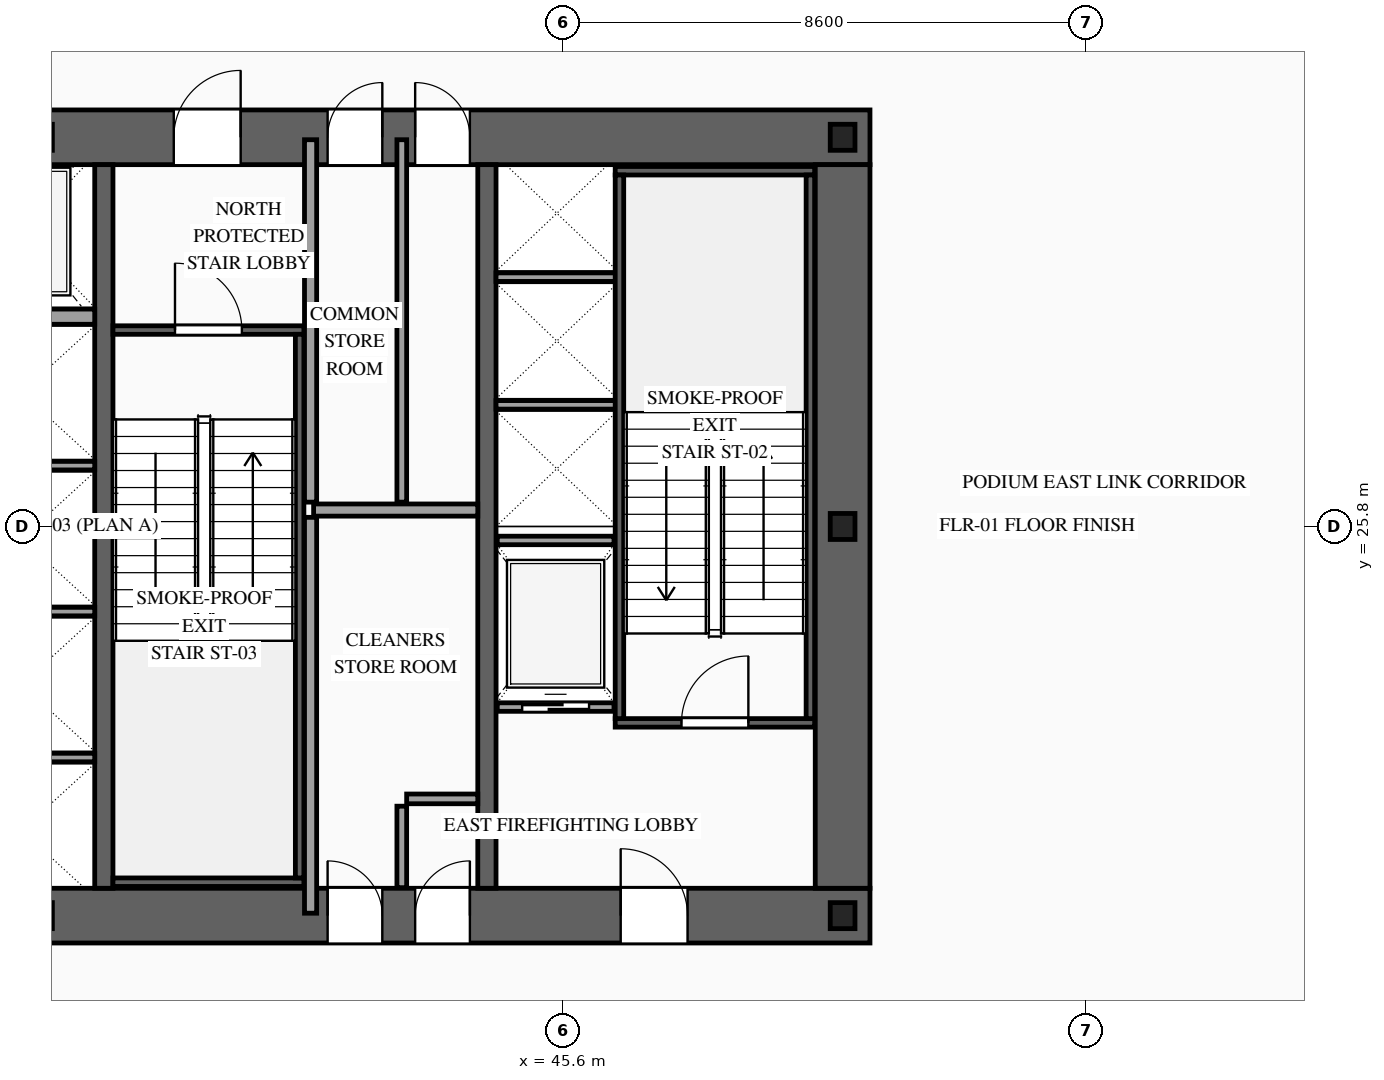
"""IFC4 building model, lengths in metres.
Left out: names, types, materials, properties, quantities, classifications, styles, units other than length and angle.
Written with IfcOpenShell. Run it as: python <this file> out.ifc"""

import sys

from ifc_helpers import new_model, si_unit, direction, frame, frame_2d, origin, origin_2d, place, context, subcontext, project, spatial, rectangle, i_section, extrude, source, transform, mapped, element, fill, save


model = new_model("IFC4")
c1 = context("Model", 3, precision=1e-05, world=origin(), true_north=direction((0.0, 1.0)))
c2 = subcontext(c1, "Body", "Model", "MODEL_VIEW")
j1 = project(units=[si_unit("LENGTHUNIT", "METRE"), si_unit("PLANEANGLEUNIT", "RADIAN")], contexts=[c1])
p1 = place(None, origin())
s1 = spatial("IfcSite", under=j1, at=p1, CompositionType="ELEMENT")
p2 = place(p1, origin())
s2 = spatial("IfcBuilding", under=s1, at=p2, CompositionType="ELEMENT")
p3 = place(p2, frame((0.0, 0.0, 5.4)))
s3 = spatial("IfcBuildingStorey", under=s2, at=p3, CompositionType="ELEMENT", Elevation=5.4)
p4 = place(p3, frame((23.35, 19.4, 0.0), z_axis=(0.0, 0.0, 1.0), x_axis=(1.0, 0.0, 0.0)))
e1 = element("IfcWall", 1, at=p4, inside=s3, PredefinedType="SHEAR", context=c2, shape_type="SweptSolid", body=[
    extrude(rectangle(XDim=27.3, YDim=0.9, at=frame_2d((13.65, 0.0))), origin(), (0.0, 0.0, 1.0), 4.8),
])
p5 = place(p4, frame((2.1, 0.0, 0.0)))
e2 = element("IfcOpeningElement", 2, at=p5, cuts=e1, PredefinedType="OPENING", context=c2, shape_type="SweptSolid", body=[
    extrude(rectangle(XDim=1.1, YDim=2.2, at=frame_2d((0.55, 1.1))), frame((0.0, 0.465, 0.0), z_axis=(0.0, -1.0, 0.0), x_axis=(1.0, 0.0, 0.0)), (0.0, 0.0, 1.0), 0.93),
])
p6 = place(p4, frame((10.0, 0.0, 0.0)))
e3 = element("IfcOpeningElement", 3, at=p6, cuts=e1, PredefinedType="OPENING", context=c2, shape_type="SweptSolid", body=[
    extrude(rectangle(XDim=1.1, YDim=2.2, at=frame_2d((0.55, 1.1))), frame((0.0, 0.465, 0.0), z_axis=(0.0, -1.0, 0.0), x_axis=(1.0, 0.0, 0.0)), (0.0, 0.0, 1.0), 0.93),
])
p7 = place(p4, frame((23.2, 0.0, 0.0)))
e4 = element("IfcOpeningElement", 4, at=p7, cuts=e1, PredefinedType="OPENING", context=c2, shape_type="SweptSolid", body=[
    extrude(rectangle(XDim=1.1, YDim=2.2, at=frame_2d((0.55, 1.1))), frame((0.0, 0.465, 0.0), z_axis=(0.0, -1.0, 0.0), x_axis=(1.0, 0.0, 0.0)), (0.0, 0.0, 1.0), 0.93),
])
p8 = place(p4, frame((19.82, 0.0, 0.0)))
e5 = element("IfcOpeningElement", 5, at=p8, cuts=e1, PredefinedType="OPENING", context=c2, shape_type="SweptSolid", body=[
    extrude(rectangle(XDim=0.9, YDim=2.15, at=frame_2d((0.45, 1.075))), frame((0.0, 0.465, 0.0), z_axis=(0.0, -1.0, 0.0), x_axis=(1.0, 0.0, 0.0)), (0.0, 0.0, 1.0), 0.93),
])
p9 = place(p4, frame((18.38, 0.0, 0.0)))
e6 = element("IfcOpeningElement", 6, at=p9, cuts=e1, PredefinedType="OPENING", context=c2, shape_type="SweptSolid", body=[
    extrude(rectangle(XDim=0.9, YDim=2.15, at=frame_2d((0.45, 1.075))), frame((0.0, 0.465, 0.0), z_axis=(0.0, -1.0, 0.0), x_axis=(1.0, 0.0, 0.0)), (0.0, 0.0, 1.0), 0.93),
])
p10 = place(p3, frame((23.35, 32.2, 0.0), z_axis=(0.0, 0.0, 1.0), x_axis=(1.0, 0.0, 0.0)))
e7 = element("IfcWall", 7, at=p10, inside=s3, PredefinedType="SHEAR", context=c2, shape_type="SweptSolid", body=[
    extrude(rectangle(XDim=27.3, YDim=0.9, at=frame_2d((13.65, 0.0))), origin(), (0.0, 0.0, 1.0), 4.8),
])
p11 = place(p10, frame((4.72, 0.0, 0.0)))
e8 = element("IfcOpeningElement", 8, at=p11, cuts=e7, PredefinedType="OPENING", context=c2, shape_type="SweptSolid", body=[
    extrude(rectangle(XDim=0.9, YDim=2.15, at=frame_2d((0.45, 1.075))), frame((0.0, 0.465, 0.0), z_axis=(0.0, -1.0, 0.0), x_axis=(1.0, 0.0, 0.0)), (0.0, 0.0, 1.0), 0.93),
])
p12 = place(p10, frame((10.0, 0.0, 0.0)))
e9 = element("IfcOpeningElement", 9, at=p12, cuts=e7, PredefinedType="OPENING", context=c2, shape_type="SweptSolid", body=[
    extrude(rectangle(XDim=1.1, YDim=2.2, at=frame_2d((0.55, 1.1))), frame((0.0, 0.465, 0.0), z_axis=(0.0, -1.0, 0.0), x_axis=(1.0, 0.0, 0.0)), (0.0, 0.0, 1.0), 0.93),
])
p13 = place(p10, frame((15.85, 0.0, 0.0)))
e10 = element("IfcOpeningElement", 10, at=p13, cuts=e7, PredefinedType="OPENING", context=c2, shape_type="SweptSolid", body=[
    extrude(rectangle(XDim=1.1, YDim=2.2, at=frame_2d((0.55, 1.1))), frame((0.0, 0.465, 0.0), z_axis=(0.0, -1.0, 0.0), x_axis=(1.0, 0.0, 0.0)), (0.0, 0.0, 1.0), 0.93),
])
p14 = place(p10, frame((18.38, 0.0, 0.0)))
e11 = element("IfcOpeningElement", 11, at=p14, cuts=e7, PredefinedType="OPENING", context=c2, shape_type="SweptSolid", body=[
    extrude(rectangle(XDim=0.9, YDim=2.15, at=frame_2d((0.45, 1.075))), frame((0.0, 0.465, 0.0), z_axis=(0.0, -1.0, 0.0), x_axis=(1.0, 0.0, 0.0)), (0.0, 0.0, 1.0), 0.93),
])
p15 = place(p10, frame((19.82, 0.0, 0.0)))
e12 = element("IfcOpeningElement", 12, at=p15, cuts=e7, PredefinedType="OPENING", context=c2, shape_type="SweptSolid", body=[
    extrude(rectangle(XDim=0.9, YDim=2.15, at=frame_2d((0.45, 1.075))), frame((0.0, 0.465, 0.0), z_axis=(0.0, -1.0, 0.0), x_axis=(1.0, 0.0, 0.0)), (0.0, 0.0, 1.0), 0.93),
])
m1 = source(origin(), c2, "Body", "SweptSolid", [
    extrude(rectangle(XDim=11.9, YDim=0.9, at=frame_2d((5.95, 0.0))), origin(), (0.0, 0.0, 1.0), 4.8),
])
p16 = place(p3, frame((50.2, 19.85, 0.0), z_axis=(0.0, 0.0, 1.0), x_axis=(0.0, 1.0, 0.0)))
e13 = element("IfcWall", 13, at=p16, inside=s3, PredefinedType="SHEAR", context=c2, shape_type="MappedRepresentation", body=[
    mapped(m1, transform((0.0, 0.0, 0.0), scale=1.0)),
])
m2 = source(origin(), c2, "Body", "SweptSolid", [
    extrude(rectangle(XDim=11.9, YDim=0.3, at=frame_2d((5.95, 0.0))), origin(), (0.0, 0.0, 1.0), 4.8),
])
for number, where, z_axis, x_axis in (
    (14, (38.05, 19.85, 0.0), (0.0, 0.0, 1.0), (0.0, 1.0, 0.0)),
    (15, (44.35, 19.85, 0.0), (0.0, 0.0, 1.0), (0.0, 1.0, 0.0)),
):
    element("IfcWall", number, at=place(p3, frame(where, z_axis=z_axis, x_axis=x_axis)), inside=s3, PredefinedType="SOLIDWALL", context=c2, shape_type="MappedRepresentation", body=[
        mapped(m2, transform((0.0, 0.0, 0.0), scale=1.0)),
    ])
m3 = source(origin(), c2, "Body", "SweptSolid", [
    extrude(i_section(OverallWidth=0.407, OverallDepth=0.428, WebThickness=0.02, FlangeThickness=0.035, at=origin_2d()), origin(), (0.0, 0.0, 1.0), 4.8),
])
for number, where, z_axis, x_axis in (
    (16, (37.0, 19.4, 0.0), (0.0, 0.0, 1.0), (1.0, 0.0, 0.0)),
    (17, (50.2, 19.4, 0.0), (0.0, 0.0, 1.0), (1.0, 0.0, 0.0)),
    (18, (50.2, 25.8, 0.0), (0.0, 0.0, 1.0), (1.0, 0.0, 0.0)),
    (19, (37.0, 32.2, 0.0), (0.0, 0.0, 1.0), (1.0, 0.0, 0.0)),
    (20, (50.2, 32.2, 0.0), (0.0, 0.0, 1.0), (1.0, 0.0, 0.0)),
):
    element("IfcColumn", number, at=place(p3, frame(where, z_axis=z_axis, x_axis=x_axis)), inside=s3, PredefinedType="COLUMN", context=c2, shape_type="MappedRepresentation", body=[
        mapped(m3, transform((0.0, 0.0, 0.0), scale=1.0)),
    ])
p17 = place(p3, frame((44.52, 22.83, 0.0), z_axis=(0.0, 0.0, 1.0), x_axis=(1.0, 0.0, 0.0)))
e21 = element("IfcWall", 21, at=p17, inside=s3, PredefinedType="SOLIDWALL", context=c2, shape_type="SweptSolid", body=[
    extrude(rectangle(XDim=1.92, YDim=0.14, at=frame_2d((0.96, 0.0))), origin(), (0.0, 0.0, 1.0), 4.52),
])
p18 = place(p17, frame((0.41, 0.0, 0.0)))
e22 = element("IfcOpeningElement", 22, at=p18, cuts=e21, PredefinedType="OPENING", context=c2, shape_type="SweptSolid", body=[
    extrude(rectangle(XDim=1.1, YDim=2.2, at=frame_2d((0.55, 1.1))), frame((0.0, 0.085, 0.0), z_axis=(0.0, -1.0, 0.0), x_axis=(1.0, 0.0, 0.0)), (0.0, 0.0, 1.0), 0.17),
])
m4 = source(origin(), c2, "Body", "SweptSolid", [
    extrude(rectangle(XDim=1.92, YDim=0.14, at=frame_2d((0.96, 0.0))), origin(), (0.0, 0.0, 1.0), 4.52),
])
p19 = place(p3, frame((44.52, 25.57, 0.0), z_axis=(0.0, 0.0, 1.0), x_axis=(1.0, 0.0, 0.0)))
e23 = element("IfcWall", 23, at=p19, inside=s3, PredefinedType="SOLIDWALL", context=c2, shape_type="MappedRepresentation", body=[
    mapped(m4, transform((0.0, 0.0, 0.0), scale=1.0)),
])
m5 = source(origin(), c2, "Body", "SweptSolid", [
    extrude(rectangle(XDim=2.4, YDim=0.14, at=frame_2d((1.2, 0.0))), origin(), (0.0, 0.0, 1.0), 4.52),
])
for number, where, z_axis, x_axis in (
    (24, (35.5, 22.0, 0.0), (0.0, 0.0, 1.0), (1.0, 0.0, 0.0)),
    (25, (35.5, 24.4, 0.0), (0.0, 0.0, 1.0), (1.0, 0.0, 0.0)),
    (26, (35.5, 26.8, 0.0), (0.0, 0.0, 1.0), (1.0, 0.0, 0.0)),
):
    element("IfcWall", number, at=place(p3, frame(where, z_axis=z_axis, x_axis=x_axis)), inside=s3, PredefinedType="SOLIDWALL", context=c2, shape_type="MappedRepresentation", body=[
        mapped(m5, transform((0.0, 0.0, 0.0), scale=1.0)),
    ])
m6 = source(origin(), c2, "Body", "SweptSolid", [
    extrude(rectangle(XDim=2.4, YDim=0.25, at=frame_2d((1.2, 0.0))), origin(), (0.0, 0.0, 1.0), 4.52),
])
p20 = place(p3, frame((35.5, 29.25, 0.0), z_axis=(0.0, 0.0, 1.0), x_axis=(1.0, 0.0, 0.0)))
e27 = element("IfcWall", 27, at=p20, inside=s3, PredefinedType="SOLIDWALL", context=c2, shape_type="MappedRepresentation", body=[
    mapped(m6, transform((0.0, 0.0, 0.0), scale=1.0)),
])
m7 = source(origin(), c2, "Body", "SweptSolid", [
    extrude(rectangle(XDim=2.0, YDim=0.14, at=frame_2d((1.0, 0.0))), origin(), (0.0, 0.0, 1.0), 4.52),
])
for number, where, z_axis, x_axis in (
    (28, (44.5, 27.8, 0.0), (0.0, 0.0, 1.0), (1.0, 0.0, 0.0)),
    (29, (44.5, 29.9, 0.0), (0.0, 0.0, 1.0), (1.0, 0.0, 0.0)),
):
    element("IfcWall", number, at=place(p3, frame(where, z_axis=z_axis, x_axis=x_axis)), inside=s3, PredefinedType="SOLIDWALL", context=c2, shape_type="MappedRepresentation", body=[
        mapped(m7, transform((0.0, 0.0, 0.0), scale=1.0)),
    ])
p21 = place(p3, frame((46.46, 22.57, 0.0), z_axis=(0.0, 0.0, 1.0), x_axis=(1.0, 0.0, 0.0)))
e30 = element("IfcWall", 30, at=p21, inside=s3, PredefinedType="SOLIDWALL", context=c2, shape_type="SweptSolid", body=[
    extrude(rectangle(XDim=3.28, YDim=0.14, at=frame_2d((1.64, 0.0))), origin(), (0.0, 0.0, 1.0), 4.52),
])
p22 = place(p21, frame((1.09, 0.0, 0.0)))
e31 = element("IfcOpeningElement", 31, at=p22, cuts=e30, PredefinedType="OPENING", context=c2, shape_type="SweptSolid", body=[
    extrude(rectangle(XDim=1.1, YDim=2.2, at=frame_2d((0.55, 1.1))), frame((0.0, 0.085, 0.0), z_axis=(0.0, -1.0, 0.0), x_axis=(1.0, 0.0, 0.0)), (0.0, 0.0, 1.0), 0.17),
])
m8 = source(origin(), c2, "Body", "SweptSolid", [
    extrude(rectangle(XDim=3.28, YDim=0.14, at=frame_2d((1.64, 0.0))), origin(), (0.0, 0.0, 1.0), 4.52),
])
p23 = place(p3, frame((46.46, 31.65, 0.0), z_axis=(0.0, 0.0, 1.0), x_axis=(1.0, 0.0, 0.0)))
e32 = element("IfcWall", 32, at=p23, inside=s3, PredefinedType="SOLIDWALL", context=c2, shape_type="MappedRepresentation", body=[
    mapped(m8, transform((0.0, 0.0, 0.0), scale=1.0)),
])
m9 = source(origin(), c2, "Body", "SweptSolid", [
    extrude(rectangle(XDim=8.94, YDim=0.14, at=frame_2d((4.47, 0.0))), origin(), (0.0, 0.0, 1.0), 4.52),
])
for number, where, z_axis, x_axis in (
    (33, (46.53, 22.64, 0.0), (0.0, 0.0, 1.0), (0.0, 1.0, 0.0)),
    (34, (49.67, 22.64, 0.0), (0.0, 0.0, 1.0), (0.0, 1.0, 0.0)),
):
    element("IfcWall", number, at=place(p3, frame(where, z_axis=z_axis, x_axis=x_axis)), inside=s3, PredefinedType="SOLIDWALL", context=c2, shape_type="MappedRepresentation", body=[
        mapped(m9, transform((0.0, 0.0, 0.0), scale=1.0)),
    ])
p24 = place(p3, frame((38.2, 29.03, 0.0), z_axis=(0.0, 0.0, 1.0), x_axis=(1.0, 0.0, 0.0)))
e35 = element("IfcWall", 35, at=p24, inside=s3, PredefinedType="SOLIDWALL", context=c2, shape_type="SweptSolid", body=[
    extrude(rectangle(XDim=3.14, YDim=0.14, at=frame_2d((1.57, 0.0))), origin(), (0.0, 0.0, 1.0), 4.52),
])
p25 = place(p24, frame((1.02, 0.0, 0.0)))
e36 = element("IfcOpeningElement", 36, at=p25, cuts=e35, PredefinedType="OPENING", context=c2, shape_type="SweptSolid", body=[
    extrude(rectangle(XDim=1.1, YDim=2.2, at=frame_2d((0.55, 1.1))), frame((0.0, 0.085, 0.0), z_axis=(0.0, -1.0, 0.0), x_axis=(1.0, 0.0, 0.0)), (0.0, 0.0, 1.0), 0.17),
])
m10 = source(origin(), c2, "Body", "SweptSolid", [
    extrude(rectangle(XDim=3.14, YDim=0.14, at=frame_2d((1.57, 0.0))), origin(), (0.0, 0.0, 1.0), 4.52),
])
p26 = place(p3, frame((38.2, 19.95, 0.0), z_axis=(0.0, 0.0, 1.0), x_axis=(1.0, 0.0, 0.0)))
e37 = element("IfcWall", 37, at=p26, inside=s3, PredefinedType="SOLIDWALL", context=c2, shape_type="MappedRepresentation", body=[
    mapped(m10, transform((0.0, 0.0, 0.0), scale=1.0)),
])
m11 = source(origin(), c2, "Body", "SweptSolid", [
    extrude(rectangle(XDim=8.94, YDim=0.14, at=frame_2d((4.47, 0.0))), origin(), (0.0, 0.0, 1.0), 4.52),
])
p27 = place(p3, frame((41.27, 20.02, 0.0), z_axis=(0.0, 0.0, 1.0), x_axis=(0.0, 1.0, 0.0)))
e38 = element("IfcWall", 38, at=p27, inside=s3, PredefinedType="SOLIDWALL", context=c2, shape_type="MappedRepresentation", body=[
    mapped(m11, transform((0.0, 0.0, 0.0), scale=1.0)),
])
m12 = source(origin(), c2, "Body", "SweptSolid", [
    extrude(rectangle(XDim=1.34, YDim=0.16, at=frame_2d((0.67, 0.0))), origin(), (0.0, 0.0, 1.0), 4.52),
])
p28 = place(p3, frame((42.95, 19.86, 0.0), z_axis=(0.0, 0.0, 1.0), x_axis=(0.0, 1.0, 0.0)))
e39 = element("IfcWall", 39, at=p28, inside=s3, PredefinedType="PARTITIONING", context=c2, shape_type="MappedRepresentation", body=[
    mapped(m12, transform((0.0, 0.0, 0.0), scale=1.0)),
])
m13 = source(origin(), c2, "Body", "SweptSolid", [
    extrude(rectangle(XDim=1.17, YDim=0.16, at=frame_2d((0.585, 0.0))), origin(), (0.0, 0.0, 1.0), 4.52),
])
p29 = place(p3, frame((43.03, 21.32, 0.0), z_axis=(0.0, 0.0, 1.0), x_axis=(1.0, 0.0, 0.0)))
e40 = element("IfcWall", 40, at=p29, inside=s3, PredefinedType="PARTITIONING", context=c2, shape_type="MappedRepresentation", body=[
    mapped(m13, transform((0.0, 0.0, 0.0), scale=1.0)),
])
m14 = source(origin(), c2, "Body", "SweptSolid", [
    extrude(rectangle(XDim=6.51, YDim=0.2, at=frame_2d((3.255, 0.0))), origin(), (0.0, 0.0, 1.0), 4.52),
])
p30 = place(p3, frame((41.45, 19.44, 0.0), z_axis=(0.0, 0.0, 1.0), x_axis=(0.0, 1.0, 0.0)))
e41 = element("IfcWall", 41, at=p30, inside=s3, PredefinedType="PARTITIONING", context=c2, shape_type="MappedRepresentation", body=[
    mapped(m14, transform((0.0, 0.0, 0.0), scale=1.0)),
])
m15 = source(origin(), c2, "Body", "SweptSolid", [
    extrude(rectangle(XDim=2.7, YDim=0.2, at=frame_2d((1.35, 0.0))), origin(), (0.0, 0.0, 1.0), 4.52),
])
p31 = place(p3, frame((41.5, 26.07, 0.0), z_axis=(0.0, 0.0, 1.0), x_axis=(1.0, 0.0, 0.0)))
e42 = element("IfcWall", 42, at=p31, inside=s3, PredefinedType="PARTITIONING", context=c2, shape_type="MappedRepresentation", body=[
    mapped(m15, transform((0.0, 0.0, 0.0), scale=1.0)),
])
m16 = source(origin(), c2, "Body", "SweptSolid", [
    extrude(rectangle(XDim=5.96, YDim=0.2, at=frame_2d((2.98, 0.0))), origin(), (0.0, 0.0, 1.0), 4.52),
])
p32 = place(p3, frame((41.45, 26.2, 0.0), z_axis=(0.0, 0.0, 1.0), x_axis=(0.0, 1.0, 0.0)))
e43 = element("IfcWall", 43, at=p32, inside=s3, PredefinedType="PARTITIONING", context=c2, shape_type="MappedRepresentation", body=[
    mapped(m16, transform((0.0, 0.0, 0.0), scale=1.0)),
])
m17 = source(origin(), c2, "Body", "SweptSolid", [
    extrude(rectangle(XDim=5.96, YDim=0.16, at=frame_2d((2.98, 0.0))), origin(), (0.0, 0.0, 1.0), 4.52),
])
p33 = place(p3, frame((42.95, 26.2, 0.0), z_axis=(0.0, 0.0, 1.0), x_axis=(0.0, 1.0, 0.0)))
e44 = element("IfcWall", 44, at=p33, inside=s3, PredefinedType="PARTITIONING", context=c2, shape_type="MappedRepresentation", body=[
    mapped(m17, transform((0.0, 0.0, 0.0), scale=1.0)),
])
m18 = source(origin(), c2, "Body", "SweptSolid", [
    extrude(rectangle(XDim=1.1, YDim=2.2, at=frame_2d((0.55, 1.1))), frame((0.0, 0.025, 0.0), z_axis=(0.0, -1.0, 0.0), x_axis=(1.0, 0.0, 0.0)), (0.0, 0.0, 1.0), 0.05),
])
p34 = place(p18, origin())
e45 = element("IfcDoor", 45, at=p34, inside=s3, OperationType="SLIDING_TO_RIGHT", PredefinedType="DOOR", context=c2, shape_type="MappedRepresentation", body=[
    mapped(m18, transform((0.0, 0.0, 0.0), scale=1.0)),
])
fill(e22, e45)
m19 = source(origin(), c2, "Body", "SweptSolid", [
    extrude(rectangle(XDim=1.1, YDim=2.2, at=frame_2d((0.55, 1.1))), frame((0.0, 0.025, 0.0), z_axis=(0.0, -1.0, 0.0), x_axis=(1.0, 0.0, 0.0)), (0.0, 0.0, 1.0), 0.05),
])
p35 = place(p22, origin())
e46 = element("IfcDoor", 46, at=p35, inside=s3, OperationType="SINGLE_SWING_RIGHT", PredefinedType="DOOR", context=c2, shape_type="MappedRepresentation", body=[
    mapped(m19, transform((0.0, 0.0, 0.0), scale=1.0)),
])
fill(e31, e46)
p36 = place(p25, origin())
e47 = element("IfcDoor", 47, at=p36, inside=s3, OperationType="SINGLE_SWING_LEFT", PredefinedType="DOOR", context=c2, shape_type="MappedRepresentation", body=[
    mapped(m19, transform((0.0, 0.0, 0.0), scale=1.0)),
])
fill(e36, e47)
p37 = place(p7, origin())
e48 = element("IfcDoor", 48, at=p37, inside=s3, OperationType="SINGLE_SWING_LEFT", PredefinedType="DOOR", context=c2, shape_type="MappedRepresentation", body=[
    mapped(m19, transform((0.0, 0.0, 0.0), scale=1.0)),
])
fill(e4, e48)
p38 = place(p13, origin())
e49 = element("IfcDoor", 49, at=p38, inside=s3, OperationType="SINGLE_SWING_RIGHT", PredefinedType="DOOR", context=c2, shape_type="MappedRepresentation", body=[
    mapped(m19, transform((0.0, 0.0, 0.0), scale=1.0)),
])
fill(e10, e49)
m20 = source(origin(), c2, "Body", "SweptSolid", [
    extrude(rectangle(XDim=0.9, YDim=2.15, at=frame_2d((0.45, 1.075))), frame((0.0, 0.025, 0.0), z_axis=(0.0, -1.0, 0.0), x_axis=(1.0, 0.0, 0.0)), (0.0, 0.0, 1.0), 0.05),
])
p39 = place(p8, origin())
e50 = element("IfcDoor", 50, at=p39, inside=s3, OperationType="SINGLE_SWING_RIGHT", PredefinedType="DOOR", context=c2, shape_type="MappedRepresentation", body=[
    mapped(m20, transform((0.0, 0.0, 0.0), scale=1.0)),
])
fill(e5, e50)
p40 = place(p9, origin())
e51 = element("IfcDoor", 51, at=p40, inside=s3, OperationType="SINGLE_SWING_LEFT", PredefinedType="DOOR", context=c2, shape_type="MappedRepresentation", body=[
    mapped(m20, transform((0.0, 0.0, 0.0), scale=1.0)),
])
fill(e6, e51)
p41 = place(p14, origin())
e52 = element("IfcDoor", 52, at=p41, inside=s3, OperationType="SINGLE_SWING_RIGHT", PredefinedType="DOOR", context=c2, shape_type="MappedRepresentation", body=[
    mapped(m20, transform((0.0, 0.0, 0.0), scale=1.0)),
])
fill(e11, e52)
p42 = place(p15, origin())
e53 = element("IfcDoor", 53, at=p42, inside=s3, OperationType="SINGLE_SWING_LEFT", PredefinedType="DOOR", context=c2, shape_type="MappedRepresentation", body=[
    mapped(m20, transform((0.0, 0.0, 0.0), scale=1.0)),
])
fill(e12, e53)
save(model, sys.argv[1])
